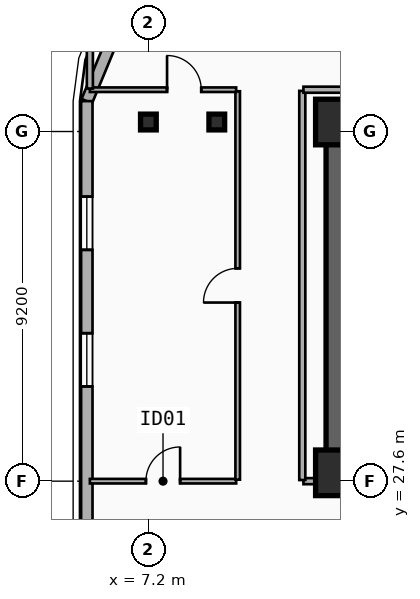
"""IFC4 building model, lengths in metres.
Left out: names, types, materials, properties, quantities, classifications, styles, units other than length and angle.
Written with IfcOpenShell. Run it as: python <this file> out.ifc"""

import sys

from ifc_helpers import new_model, si_unit, direction, frame, frame_2d, origin, origin_2d, place, context, subcontext, project, spatial, rectangle, i_section, extrude, element, fill, save


model = new_model("IFC4")
c1 = context("Model", 3, precision=1e-05, world=origin(), true_north=direction((0.0, 1.0)))
c2 = subcontext(c1, "Body", "Model", "MODEL_VIEW")
j1 = project(units=[si_unit("LENGTHUNIT", "METRE"), si_unit("PLANEANGLEUNIT", "RADIAN")], contexts=[c1])
p1 = place(None, origin())
s1 = spatial("IfcSite", under=j1, at=p1, CompositionType="ELEMENT")
p2 = place(p1, origin())
s2 = spatial("IfcBuilding", under=s1, at=p2, CompositionType="ELEMENT")
p3 = place(p2, frame((0.0, 0.0, 169.65)))
s3 = spatial("IfcBuildingStorey", under=s2, at=p3, CompositionType="ELEMENT", Elevation=169.65)
p4 = place(p3, frame((12.15, 37.05, 0.0), z_axis=(0.0, 0.0, 1.0), x_axis=(1.0, 0.0, 0.0)))
e1 = element("IfcWall", 1, at=p4, inside=s3, PredefinedType="SHEAR", context=c2, shape_type="SweptSolid", body=[
    extrude(rectangle(XDim=33.23, YDim=0.55, at=frame_2d((16.615, 0.0))), origin(), (0.0, 0.0, 1.0), 3.55),
])
p5 = place(p3, frame((21.18, 27.82, 0.0), z_axis=(0.0, 0.0, 1.0), x_axis=(-1.0, 0.0, 0.0)))
e2 = element("IfcWall", 2, at=p5, inside=s3, PredefinedType="SHEAR", context=c2, shape_type="SweptSolid", body=[
    extrude(rectangle(XDim=9.03, YDim=0.55, at=frame_2d((4.515, 0.0))), origin(), (0.0, 0.0, 1.0), 3.55),
])
p6 = place(p5, frame((2.68, 0.0, 0.0)))
e3 = element("IfcOpeningElement", 3, at=p6, cuts=e2, PredefinedType="OPENING", context=c2, shape_type="SweptSolid", body=[
    extrude(rectangle(XDim=1.1, YDim=2.15, at=frame_2d((0.55, 1.075))), frame((0.0, 0.285, 0.0), z_axis=(0.0, -1.0, 0.0), x_axis=(1.0, 0.0, 0.0)), (0.0, 0.0, 1.0), 0.57),
])
p7 = place(p3, frame((12.15, 28.095, 0.0), z_axis=(0.0, 0.0, 1.0), x_axis=(0.0, 1.0, 0.0)))
e4 = element("IfcWall", 4, at=p7, inside=s3, PredefinedType="SHEAR", context=c2, shape_type="SweptSolid", body=[
    extrude(rectangle(XDim=8.68, YDim=0.55, at=frame_2d((4.34, 0.0))), origin(), (0.0, 0.0, 1.0), 3.55),
])
for number, where, z_axis, x_axis in (
    (5, (12.2, 27.82, 0.0), (0.0, 0.0, 1.0), (1.0, 0.0, 0.0)),
    (6, (12.2, 37.05, 0.0), (0.0, 0.0, 1.0), (1.0, 0.0, 0.0)),
):
    element("IfcColumn", number, at=place(p3, frame(where, z_axis=z_axis, x_axis=x_axis)), inside=s3, PredefinedType="COLUMN", context=c2, shape_type="SweptSolid", body=[
        extrude(rectangle(XDim=1.2, YDim=1.2, at=origin_2d()), origin(), (0.0, 0.0, 1.0), 3.55),
    ])
for number, where, z_axis, x_axis in (
    (7, (9.0, 37.05, 0.0), (0.0, 0.0, 1.0), (1.0, 0.0, 0.0)),
    (8, (7.2, 37.05, 0.0), (0.0, 0.0, 1.0), (1.0, 0.0, 0.0)),
):
    element("IfcColumn", number, at=place(p3, frame(where, z_axis=z_axis, x_axis=x_axis)), inside=s3, PredefinedType="COLUMN", context=c2, shape_type="SweptSolid", body=[
        extrude(i_section(OverallWidth=0.413, OverallDepth=0.415, WebThickness=0.03, FlangeThickness=0.047, FilletRadius=0.015, at=origin_2d()), origin(), (0.0, 0.0, 1.0), 3.55),
    ])
p8 = place(p3, frame((5.58, 37.6, 0.0), z_axis=(0.0, 0.0, 1.0), x_axis=(0.382636798336, 0.92389884758, 0.0)))
e9 = element("IfcWall", 9, at=p8, inside=s3, PredefinedType="SOLIDWALL", context=c2, shape_type="SweptSolid", body=[
    extrude(rectangle(XDim=3.077, YDim=0.3, at=frame_2d((1.538, 0.0))), origin(), (0.0, 0.0, 1.0), 3.29),
])
p9 = place(p3, frame((5.58, 14.6, 0.0), z_axis=(0.0, 0.0, 1.0), x_axis=(0.0, 1.0, 0.0)))
e10 = element("IfcWall", 10, at=p9, inside=s3, PredefinedType="SOLIDWALL", context=c2, shape_type="SweptSolid", body=[
    extrude(rectangle(XDim=23.0, YDim=0.3, at=frame_2d((11.5, 0.0))), origin(), (0.0, 0.0, 1.0), 3.29),
])
p10 = place(p9, frame((15.493, 0.0, 0.34)))
e11 = element("IfcOpeningElement", 11, at=p10, cuts=e10, PredefinedType="OPENING", context=c2, shape_type="SweptSolid", body=[
    extrude(rectangle(XDim=1.4, YDim=2.1, at=frame_2d((0.7, 1.05))), frame((0.0, 0.16, 0.0), z_axis=(0.0, -1.0, 0.0), x_axis=(1.0, 0.0, 0.0)), (0.0, 0.0, 1.0), 0.32),
])
p11 = place(p9, frame((19.087, 0.0, 0.34)))
e12 = element("IfcOpeningElement", 12, at=p11, cuts=e10, PredefinedType="OPENING", context=c2, shape_type="SweptSolid", body=[
    extrude(rectangle(XDim=1.4, YDim=2.1, at=frame_2d((0.7, 1.05))), frame((0.0, 0.16, 0.0), z_axis=(0.0, -1.0, 0.0), x_axis=(1.0, 0.0, 0.0)), (0.0, 0.0, 1.0), 0.32),
])
p12 = place(p9, frame((2.83, 0.0, 0.34)))
e13 = element("IfcOpeningElement", 13, at=p12, cuts=e10, PredefinedType="OPENING", context=c2, shape_type="SweptSolid", body=[
    extrude(rectangle(XDim=1.4, YDim=2.1, at=frame_2d((0.7, 1.05))), frame((0.0, 0.16, 0.0), z_axis=(0.0, -1.0, 0.0), x_axis=(1.0, 0.0, 0.0)), (0.0, 0.0, 1.0), 0.32),
])
p13 = place(p9, frame((6.74, 0.0, 0.34)))
e14 = element("IfcOpeningElement", 14, at=p13, cuts=e10, PredefinedType="OPENING", context=c2, shape_type="SweptSolid", body=[
    extrude(rectangle(XDim=1.4, YDim=2.1, at=frame_2d((0.7, 1.05))), frame((0.0, 0.16, 0.0), z_axis=(0.0, -1.0, 0.0), x_axis=(1.0, 0.0, 0.0)), (0.0, 0.0, 1.0), 0.32),
])
p14 = place(p3, frame((5.66, 27.6, 0.0), z_axis=(0.0, 0.0, 1.0), x_axis=(1.0, 0.0, 0.0)))
e15 = element("IfcWall", 15, at=p14, inside=s3, PredefinedType="PARTITIONING", context=c2, shape_type="SweptSolid", body=[
    extrude(rectangle(XDim=3.85, YDim=0.12, at=frame_2d((1.925, 0.0))), origin(), (0.0, 0.0, 1.0), 2.62),
])
p15 = place(p14, frame((1.475, 0.0, 0.0)))
e16 = element("IfcOpeningElement", 16, at=p15, cuts=e15, PredefinedType="OPENING", context=c2, shape_type="SweptSolid", body=[
    extrude(rectangle(XDim=0.9, YDim=2.1, at=frame_2d((0.45, 1.05))), frame((0.0, 0.07, 0.0), z_axis=(0.0, -1.0, 0.0), x_axis=(1.0, 0.0, 0.0)), (0.0, 0.0, 1.0), 0.14),
])
p16 = place(p3, frame((9.55, 27.64, 0.0), z_axis=(0.0, 0.0, 1.0), x_axis=(0.0, 1.0, 0.0)))
e17 = element("IfcWall", 17, at=p16, inside=s3, PredefinedType="PARTITIONING", context=c2, shape_type="SweptSolid", body=[
    extrude(rectangle(XDim=10.22, YDim=0.12, at=frame_2d((5.11, 0.0))), origin(), (0.0, 0.0, 1.0), 2.77),
])
p17 = place(p16, frame((4.66, 0.0, 0.0)))
e18 = element("IfcOpeningElement", 18, at=p17, cuts=e17, PredefinedType="OPENING", context=c2, shape_type="SweptSolid", body=[
    extrude(rectangle(XDim=0.9, YDim=2.1, at=frame_2d((0.45, 1.05))), frame((0.0, 0.07, 0.0), z_axis=(0.0, -1.0, 0.0), x_axis=(1.0, 0.0, 0.0)), (0.0, 0.0, 1.0), 0.14),
])
p18 = place(p3, frame((5.66, 37.9, 0.0), z_axis=(0.0, 0.0, 1.0), x_axis=(1.0, 0.0, 0.0)))
e19 = element("IfcWall", 19, at=p18, inside=s3, PredefinedType="PARTITIONING", context=c2, shape_type="SweptSolid", body=[
    extrude(rectangle(XDim=3.85, YDim=0.12, at=frame_2d((1.925, 0.0))), origin(), (0.0, 0.0, 1.0), 3.29),
])
p19 = place(p18, frame((2.031, 0.0, 0.0)))
e20 = element("IfcOpeningElement", 20, at=p19, cuts=e19, PredefinedType="OPENING", context=c2, shape_type="SweptSolid", body=[
    extrude(rectangle(XDim=0.9, YDim=2.1, at=frame_2d((0.45, 1.05))), frame((0.0, 0.07, 0.0), z_axis=(0.0, -1.0, 0.0), x_axis=(1.0, 0.0, 0.0)), (0.0, 0.0, 1.0), 0.14),
])
p20 = place(p3, frame((11.28, 27.6, 0.0), z_axis=(0.0, 0.0, 1.0), x_axis=(1.0, 0.0, 0.0)))
e21 = element("IfcWall", 21, at=p20, inside=s3, PredefinedType="PARTITIONING", context=c2, shape_type="SweptSolid", body=[
    extrude(rectangle(XDim=0.84, YDim=0.16, at=frame_2d((0.42, 0.0))), origin(), (0.0, 0.0, 1.0), 2.36),
])
p21 = place(p3, frame((11.25, 27.63, 0.0), z_axis=(0.0, 0.0, 1.0), x_axis=(0.0, 1.0, 0.0)))
e22 = element("IfcWall", 22, at=p21, inside=s3, PredefinedType="PARTITIONING", context=c2, shape_type="SweptSolid", body=[
    extrude(rectangle(XDim=10.24, YDim=0.16, at=frame_2d((5.12, 0.0))), origin(), (0.0, 0.0, 1.0), 2.77),
])
p22 = place(p3, frame((11.28, 37.9, 0.0), z_axis=(0.0, 0.0, 1.0), x_axis=(1.0, 0.0, 0.0)))
e23 = element("IfcWall", 23, at=p22, inside=s3, PredefinedType="PARTITIONING", context=c2, shape_type="SweptSolid", body=[
    extrude(rectangle(XDim=35.04, YDim=0.16, at=frame_2d((17.52, 0.0))), origin(), (0.0, 0.0, 1.0), 3.29),
])
p23 = place(p3, frame((5.66, 37.93, 0.0), z_axis=(0.0, 0.0, 1.0), x_axis=(0.0, 1.0, 0.0)))
e24 = element("IfcWall", 24, at=p23, inside=s3, PredefinedType="PARTITIONING", context=c2, shape_type="SweptSolid", body=[
    extrude(rectangle(XDim=1.44, YDim=0.16, at=frame_2d((0.72, 0.0))), origin(), (0.0, 0.0, 1.0), 3.29),
])
p24 = place(p10, origin())
e25 = element("IfcWindow", 25, at=p24, inside=s3, PartitioningType="SINGLE_PANEL", PredefinedType="WINDOW", context=c2, shape_type="SweptSolid", body=[
    extrude(rectangle(XDim=1.4, YDim=2.1, at=frame_2d((0.7, 1.05))), frame((0.0, 0.03, 0.0), z_axis=(0.0, -1.0, 0.0), x_axis=(1.0, 0.0, 0.0)), (0.0, 0.0, 1.0), 0.06),
])
fill(e11, e25)
p25 = place(p11, origin())
e26 = element("IfcWindow", 26, at=p25, inside=s3, PartitioningType="SINGLE_PANEL", PredefinedType="WINDOW", context=c2, shape_type="SweptSolid", body=[
    extrude(rectangle(XDim=1.4, YDim=2.1, at=frame_2d((0.7, 1.05))), frame((0.0, 0.03, 0.0), z_axis=(0.0, -1.0, 0.0), x_axis=(1.0, 0.0, 0.0)), (0.0, 0.0, 1.0), 0.06),
])
fill(e12, e26)
p26 = place(p15, origin())
e27 = element("IfcDoor", 27, at=p26, inside=s3, OperationType="SINGLE_SWING_RIGHT", PredefinedType="DOOR", context=c2, shape_type="SweptSolid", body=[
    extrude(rectangle(XDim=0.9, YDim=2.1, at=frame_2d((0.45, 1.05))), frame((0.0, 0.025, 0.0), z_axis=(0.0, -1.0, 0.0), x_axis=(1.0, 0.0, 0.0)), (0.0, 0.0, 1.0), 0.05),
])
fill(e16, e27)
p27 = place(p17, origin())
e28 = element("IfcDoor", 28, at=p27, inside=s3, OperationType="SINGLE_SWING_LEFT", PredefinedType="DOOR", context=c2, shape_type="SweptSolid", body=[
    extrude(rectangle(XDim=0.9, YDim=2.1, at=frame_2d((0.45, 1.05))), frame((0.0, 0.025, 0.0), z_axis=(0.0, -1.0, 0.0), x_axis=(1.0, 0.0, 0.0)), (0.0, 0.0, 1.0), 0.05),
])
fill(e18, e28)
p28 = place(p19, origin())
e29 = element("IfcDoor", 29, at=p28, inside=s3, OperationType="SINGLE_SWING_LEFT", PredefinedType="DOOR", context=c2, shape_type="SweptSolid", body=[
    extrude(rectangle(XDim=0.9, YDim=2.1, at=frame_2d((0.45, 1.05))), frame((0.0, 0.025, 0.0), z_axis=(0.0, -1.0, 0.0), x_axis=(1.0, 0.0, 0.0)), (0.0, 0.0, 1.0), 0.05),
])
fill(e20, e29)
save(model, sys.argv[1])
